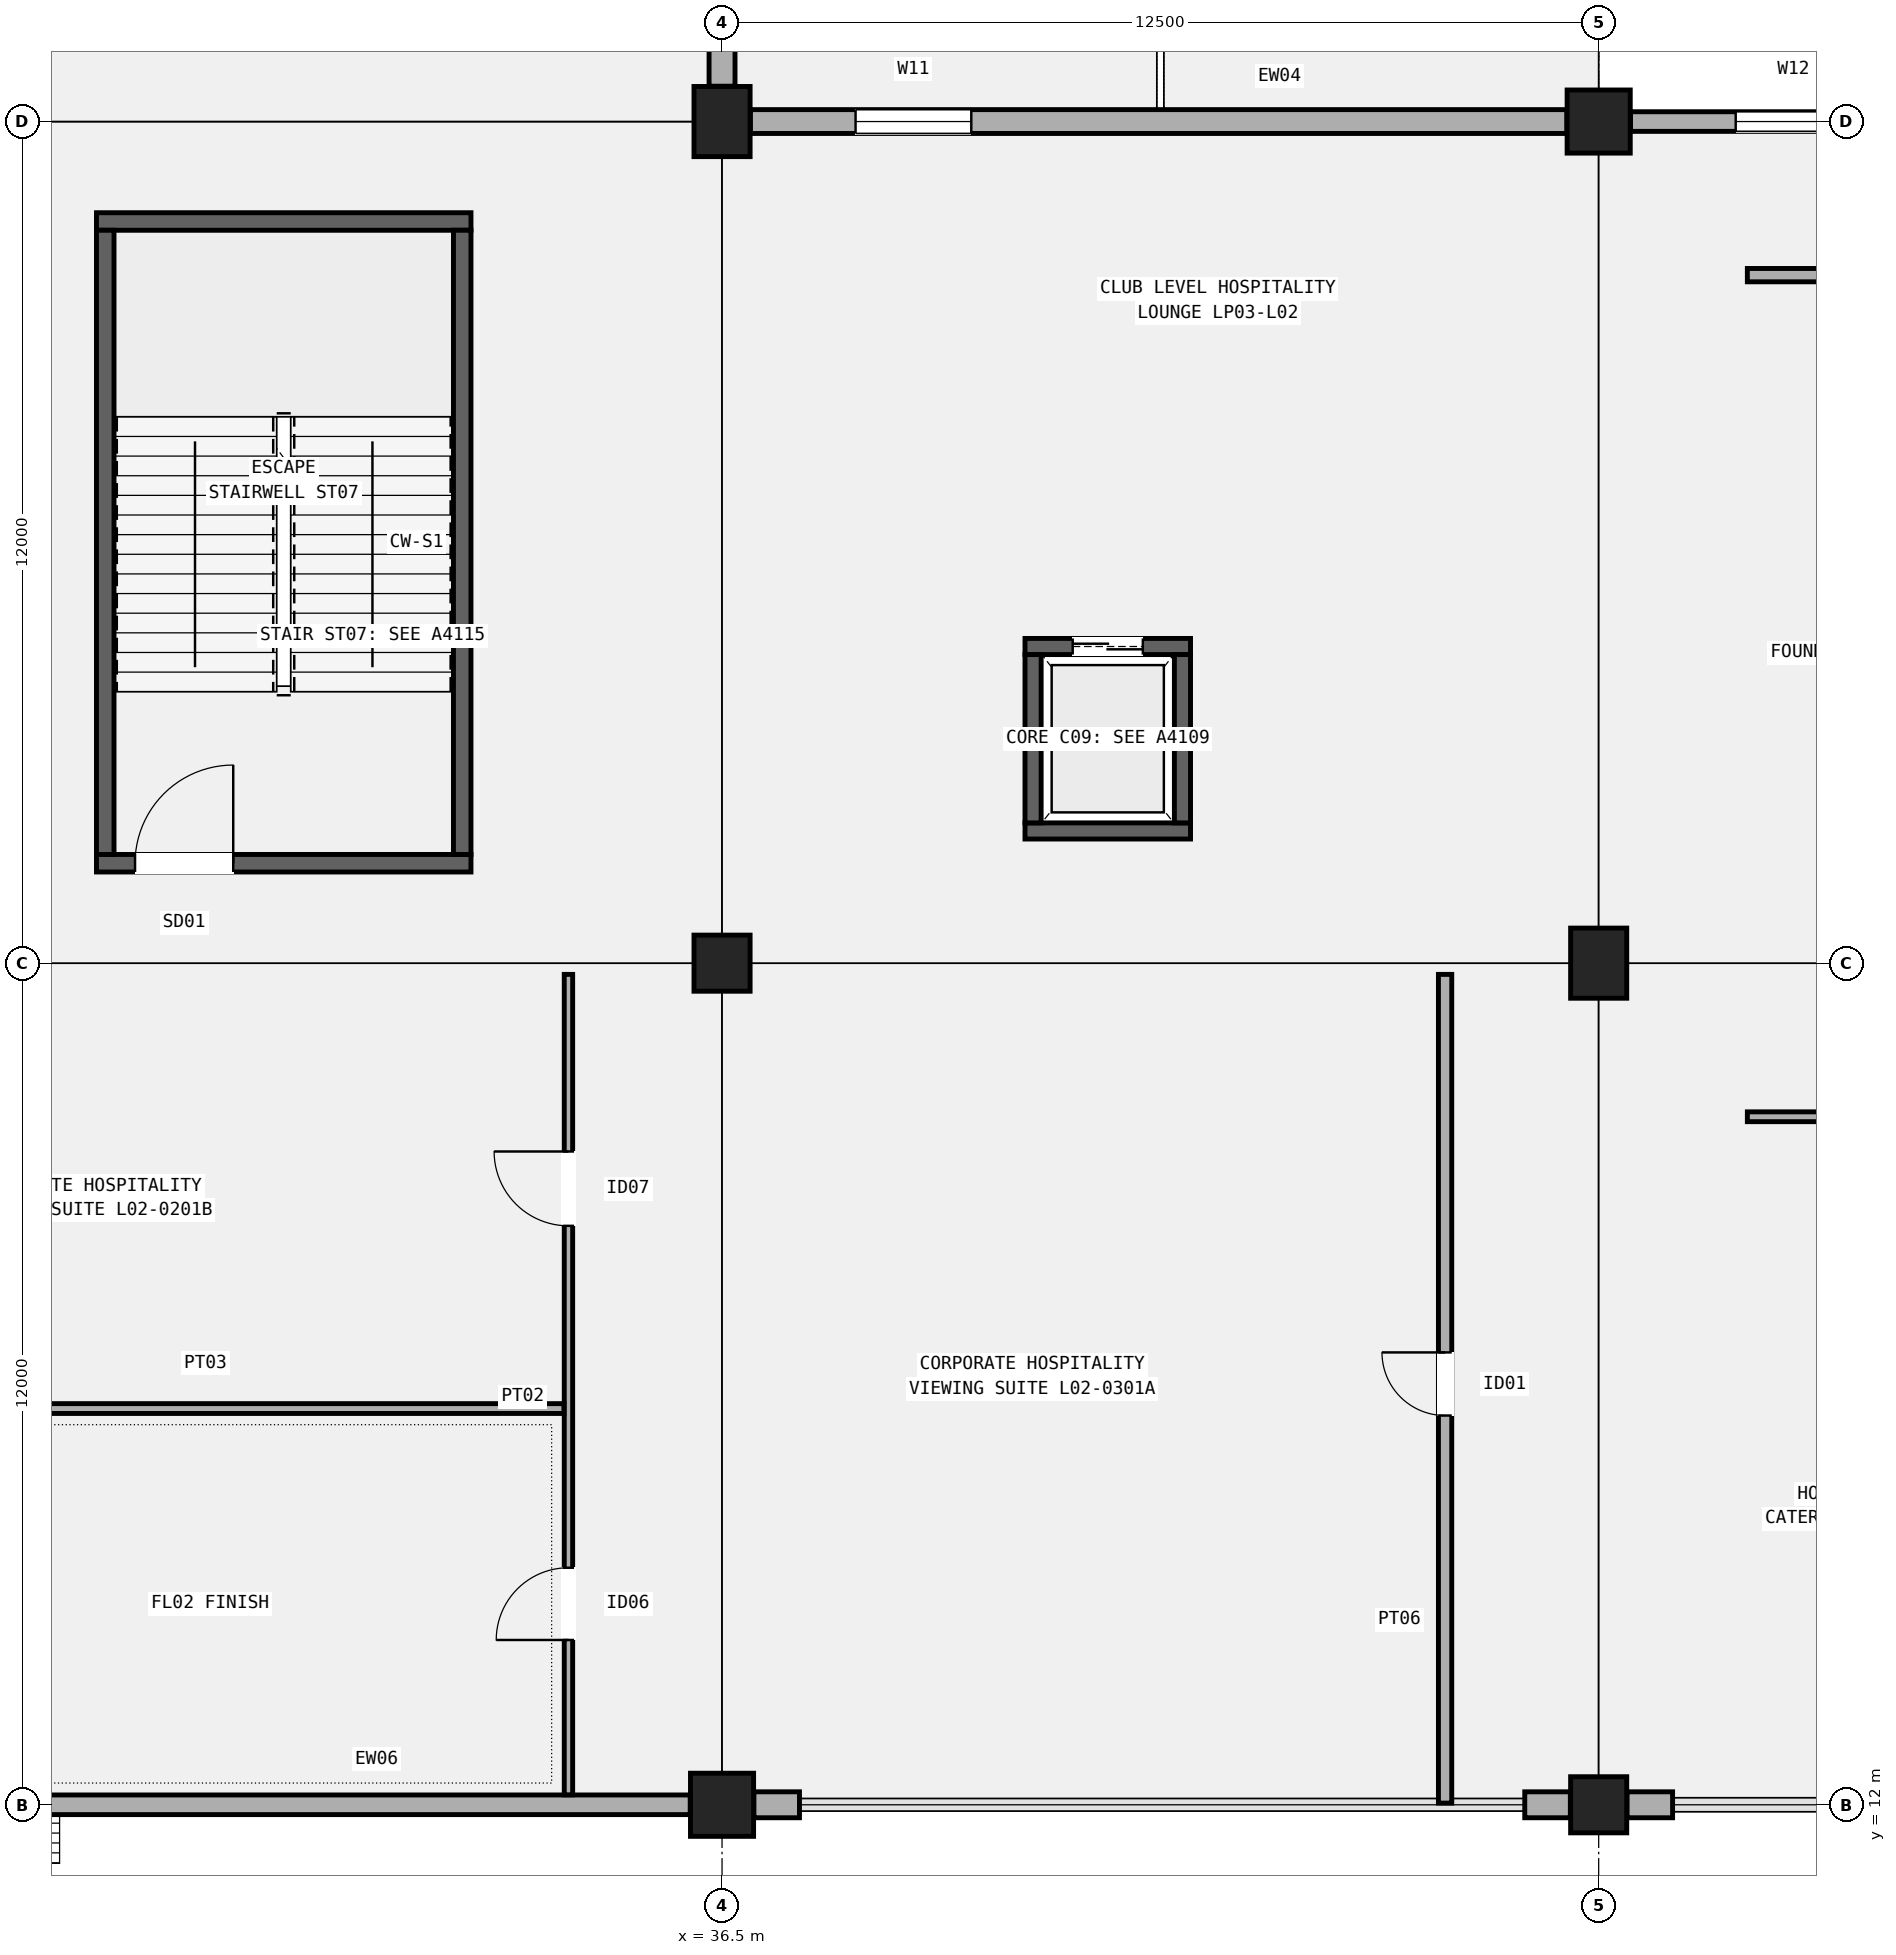
"""IFC4 building model, lengths in metres.
Left out: names, types, materials, properties, quantities, classifications, styles, units other than length and angle.
Written with IfcOpenShell. Run it as: python <this file> out.ifc"""

import sys

from ifc_helpers import new_model, si_unit, direction, frame, frame_2d, origin, origin_2d, place, context, subcontext, project, spatial, rectangle, extrude, element, fill, save


model = new_model("IFC4")
c1 = context("Model", 3, precision=1e-05, world=origin(), true_north=direction((0.0, 1.0)))
c2 = subcontext(c1, "Body", "Model", "MODEL_VIEW")
j1 = project(units=[si_unit("LENGTHUNIT", "METRE"), si_unit("PLANEANGLEUNIT", "RADIAN")], contexts=[c1])
p1 = place(None, origin())
s1 = spatial("IfcSite", under=j1, at=p1, CompositionType="ELEMENT")
p2 = place(p1, origin())
s2 = spatial("IfcBuilding", under=s1, at=p2, CompositionType="ELEMENT")
p3 = place(p2, frame((0.0, 0.0, 10.2)))
s3 = spatial("IfcBuildingStorey", under=s2, at=p3, CompositionType="ELEMENT", Elevation=10.2)
p4 = place(p3, frame((36.5, 12.0, 0.0), z_axis=(0.0, 0.0, 1.0), x_axis=(1.0, 0.0, 0.0)))
e1 = element("IfcColumn", 1, at=p4, inside=s3, PredefinedType="COLUMN", context=c2, shape_type="SweptSolid", body=[
    extrude(rectangle(XDim=0.9, YDim=0.9, at=origin_2d()), origin(), (0.0, 0.0, 1.0), 5.1),
])
p5 = place(p3, frame((36.5, 24.0, 0.0), z_axis=(0.0, 0.0, 1.0), x_axis=(1.0, 0.0, 0.0)))
e2 = element("IfcColumn", 2, at=p5, inside=s3, PredefinedType="COLUMN", context=c2, shape_type="SweptSolid", body=[
    extrude(rectangle(XDim=0.8, YDim=0.8, at=origin_2d()), origin(), (0.0, 0.0, 1.0), 5.1),
])
p6 = place(p3, frame((36.5, 36.0, 0.0), z_axis=(0.0, 0.0, 1.0), x_axis=(1.0, 0.0, 0.0)))
e3 = element("IfcColumn", 3, at=p6, inside=s3, PredefinedType="COLUMN", context=c2, shape_type="SweptSolid", body=[
    extrude(rectangle(XDim=0.8, YDim=1.0, at=origin_2d()), origin(), (0.0, 0.0, 1.0), 5.1),
])
p7 = place(p3, frame((49.0, 12.0, 0.0), z_axis=(0.0, 0.0, 1.0), x_axis=(1.0, 0.0, 0.0)))
e4 = element("IfcColumn", 4, at=p7, inside=s3, PredefinedType="COLUMN", context=c2, shape_type="SweptSolid", body=[
    extrude(rectangle(XDim=0.8, YDim=0.8, at=origin_2d()), origin(), (0.0, 0.0, 1.0), 5.1),
])
p8 = place(p3, frame((49.0, 24.0, 0.0), z_axis=(0.0, 0.0, 1.0), x_axis=(1.0, 0.0, 0.0)))
e5 = element("IfcColumn", 5, at=p8, inside=s3, PredefinedType="COLUMN", context=c2, shape_type="SweptSolid", body=[
    extrude(rectangle(XDim=0.8, YDim=1.0, at=origin_2d()), origin(), (0.0, 0.0, 1.0), 5.1),
])
p9 = place(p3, frame((49.0, 36.0, 0.0), z_axis=(0.0, 0.0, 1.0), x_axis=(1.0, 0.0, 0.0)))
e6 = element("IfcColumn", 6, at=p9, inside=s3, PredefinedType="COLUMN", context=c2, shape_type="SweptSolid", body=[
    extrude(rectangle(XDim=0.9, YDim=0.9, at=origin_2d()), origin(), (0.0, 0.0, 1.0), 5.1),
])
p10 = place(p3, frame((24.404, 12.0, 0.0), z_axis=(0.0, 0.0, 1.0), x_axis=(1.0, 0.0, 0.0)))
e7 = element("IfcWall", 7, at=p10, inside=s3, PredefinedType="SOLIDWALL", context=c2, shape_type="SweptSolid", body=[
    extrude(rectangle(XDim=11.642, YDim=0.28, at=frame_2d((5.821, 0.0))), origin(), (0.0, 0.0, 1.0), 4.02),
])
p11 = place(p10, frame((1.5, 0.0, 0.95)))
e8 = element("IfcOpeningElement", 8, at=p11, cuts=e7, PredefinedType="OPENING", context=c2, shape_type="SweptSolid", body=[
    extrude(rectangle(XDim=0.9, YDim=2.7, at=frame_2d((0.45, 1.35))), frame((0.0, 0.15, 0.0), z_axis=(0.0, -1.0, 0.0), x_axis=(1.0, 0.0, 0.0)), (0.0, 0.0, 1.0), 0.3),
])
p12 = place(p3, frame((36.5, 36.504, 0.0), z_axis=(0.0, 0.0, 1.0), x_axis=(0.0, 1.0, 0.0)))
e9 = element("IfcWall", 9, at=p12, inside=s3, PredefinedType="SOLIDWALL", context=c2, shape_type="SweptSolid", body=[
    extrude(rectangle(XDim=0.65, YDim=0.37, at=frame_2d((0.325, 0.0))), origin(), (0.0, 0.0, 1.0), 4.02),
])
for number, where, z_axis, x_axis in (
    (10, (36.954, 12.0, 0.0), (0.0, 0.0, 1.0), (1.0, 0.0, 0.0)),
    (11, (47.946, 12.0, 0.0), (0.0, 0.0, 1.0), (1.0, 0.0, 0.0)),
):
    element("IfcWall", number, at=place(p3, frame(where, z_axis=z_axis, x_axis=x_axis)), inside=s3, PredefinedType="SOLIDWALL", context=c2, shape_type="SweptSolid", body=[
        extrude(rectangle(XDim=0.65, YDim=0.37, at=frame_2d((0.325, 0.0))), origin(), (0.0, 0.0, 1.0), 4.12),
    ])
p13 = place(p3, frame((36.904, 36.0, 0.0), z_axis=(0.0, 0.0, 1.0), x_axis=(1.0, 0.0, 0.0)))
e12 = element("IfcWall", 12, at=p13, inside=s3, PredefinedType="SOLIDWALL", context=c2, shape_type="SweptSolid", body=[
    extrude(rectangle(XDim=11.642, YDim=0.34, at=frame_2d((5.821, 0.0))), origin(), (0.0, 0.0, 1.0), 4.02),
])
p14 = place(p13, frame((1.5, 0.0, 0.95)))
e13 = element("IfcOpeningElement", 13, at=p14, cuts=e12, PredefinedType="OPENING", context=c2, shape_type="SweptSolid", body=[
    extrude(rectangle(XDim=1.65, YDim=2.05, at=frame_2d((0.825, 1.025))), frame((0.0, 0.18, 0.0), z_axis=(0.0, -1.0, 0.0), x_axis=(1.0, 0.0, 0.0)), (0.0, 0.0, 1.0), 0.36),
])
p15 = place(p3, frame((49.404, 12.0, 0.0), z_axis=(0.0, 0.0, 1.0), x_axis=(1.0, 0.0, 0.0)))
e14 = element("IfcWall", 14, at=p15, inside=s3, PredefinedType="SOLIDWALL", context=c2, shape_type="SweptSolid", body=[
    extrude(rectangle(XDim=0.65, YDim=0.37, at=frame_2d((0.325, 0.0))), origin(), (0.0, 0.0, 1.0), 4.22),
])
p16 = place(p3, frame((49.454, 36.0, 0.0), z_axis=(0.0, 0.0, 1.0), x_axis=(1.0, 0.0, 0.0)))
e15 = element("IfcWall", 15, at=p16, inside=s3, PredefinedType="SOLIDWALL", context=c2, shape_type="SweptSolid", body=[
    extrude(rectangle(XDim=11.642, YDim=0.28, at=frame_2d((5.821, 0.0))), origin(), (0.0, 0.0, 1.0), 4.12),
])
p17 = place(p16, frame((1.5, 0.0, 0.95)))
e16 = element("IfcOpeningElement", 16, at=p17, cuts=e15, PredefinedType="OPENING", context=c2, shape_type="SweptSolid", body=[
    extrude(rectangle(XDim=1.65, YDim=2.45, at=frame_2d((0.825, 1.225))), frame((0.0, 0.15, 0.0), z_axis=(0.0, -1.0, 0.0), x_axis=(1.0, 0.0, 0.0)), (0.0, 0.0, 1.0), 0.3),
])
p18 = place(p3, frame((27.58, 25.425, 0.0), z_axis=(0.0, 0.0, 1.0), x_axis=(1.0, 0.0, 0.0)))
e17 = element("IfcWall", 17, at=p18, inside=s3, PredefinedType="SHEAR", context=c2, shape_type="SweptSolid", body=[
    extrude(rectangle(XDim=5.34, YDim=0.25, at=frame_2d((2.67, 0.0))), origin(), (0.0, 0.0, 1.0), 4.82),
])
p19 = place(p18, frame((0.55, 0.0, 0.0)))
e18 = element("IfcOpeningElement", 18, at=p19, cuts=e17, PredefinedType="OPENING", context=c2, shape_type="SweptSolid", body=[
    extrude(rectangle(XDim=1.4, YDim=2.15, at=frame_2d((0.7, 1.075))), frame((0.0, 0.135, 0.0), z_axis=(0.0, -1.0, 0.0), x_axis=(1.0, 0.0, 0.0)), (0.0, 0.0, 1.0), 0.27),
])
p20 = place(p3, frame((27.58, 34.575, 0.0), z_axis=(0.0, 0.0, 1.0), x_axis=(1.0, 0.0, 0.0)))
e19 = element("IfcWall", 19, at=p20, inside=s3, PredefinedType="SHEAR", context=c2, shape_type="SweptSolid", body=[
    extrude(rectangle(XDim=5.34, YDim=0.25, at=frame_2d((2.67, 0.0))), origin(), (0.0, 0.0, 1.0), 4.82),
])
for number, where, z_axis, x_axis in (
    (20, (27.705, 25.55, 0.0), (0.0, 0.0, 1.0), (0.0, 1.0, 0.0)),
    (21, (32.795, 25.55, 0.0), (0.0, 0.0, 1.0), (0.0, 1.0, 0.0)),
):
    element("IfcWall", number, at=place(p3, frame(where, z_axis=z_axis, x_axis=x_axis)), inside=s3, PredefinedType="SHEAR", context=c2, shape_type="SweptSolid", body=[
        extrude(rectangle(XDim=8.9, YDim=0.25, at=frame_2d((4.45, 0.0))), origin(), (0.0, 0.0, 1.0), 4.82),
    ])
p21 = place(p3, frame((40.82, 25.885, 0.0), z_axis=(0.0, 0.0, 1.0), x_axis=(1.0, 0.0, 0.0)))
e22 = element("IfcWall", 22, at=p21, inside=s3, PredefinedType="SHEAR", context=c2, shape_type="SweptSolid", body=[
    extrude(rectangle(XDim=2.36, YDim=0.23, at=frame_2d((1.18, 0.0))), origin(), (0.0, 0.0, 1.0), 4.82),
])
p22 = place(p3, frame((40.82, 28.515, 0.0), z_axis=(0.0, 0.0, 1.0), x_axis=(1.0, 0.0, 0.0)))
e23 = element("IfcWall", 23, at=p22, inside=s3, PredefinedType="SHEAR", context=c2, shape_type="SweptSolid", body=[
    extrude(rectangle(XDim=2.36, YDim=0.23, at=frame_2d((1.18, 0.0))), origin(), (0.0, 0.0, 1.0), 4.82),
])
p23 = place(p22, frame((0.68, 0.0, 0.0)))
e24 = element("IfcOpeningElement", 24, at=p23, cuts=e23, PredefinedType="OPENING", context=c2, shape_type="SweptSolid", body=[
    extrude(rectangle(XDim=1.0, YDim=2.15, at=frame_2d((0.5, 1.075))), frame((0.0, 0.125, 0.0), z_axis=(0.0, -1.0, 0.0), x_axis=(1.0, 0.0, 0.0)), (0.0, 0.0, 1.0), 0.25),
])
for number, where, z_axis, x_axis in (
    (25, (40.935, 26.0, 0.0), (0.0, 0.0, 1.0), (0.0, 1.0, 0.0)),
    (26, (43.065, 26.0, 0.0), (0.0, 0.0, 1.0), (0.0, 1.0, 0.0)),
):
    element("IfcWall", number, at=place(p3, frame(where, z_axis=z_axis, x_axis=x_axis)), inside=s3, PredefinedType="SHEAR", context=c2, shape_type="SweptSolid", body=[
        extrude(rectangle(XDim=2.4, YDim=0.23, at=frame_2d((1.2, 0.0))), origin(), (0.0, 0.0, 1.0), 4.82),
    ])
p24 = place(p3, frame((34.31, 12.142, 0.0), z_axis=(0.0, 0.0, 1.0), x_axis=(0.0, 1.0, 0.0)))
e27 = element("IfcWall", 27, at=p24, inside=s3, PredefinedType="PARTITIONING", context=c2, shape_type="SweptSolid", body=[
    extrude(rectangle(XDim=11.698, YDim=0.12, at=frame_2d((5.849, 0.0))), origin(), (0.0, 0.0, 1.0), 4.22),
])
p25 = place(p24, frame((2.208, 0.0, 0.0)))
e28 = element("IfcOpeningElement", 28, at=p25, cuts=e27, PredefinedType="OPENING", context=c2, shape_type="SweptSolid", body=[
    extrude(rectangle(XDim=1.03, YDim=2.12, at=frame_2d((0.515, 1.06))), frame((0.0, 0.07, 0.0), z_axis=(0.0, -1.0, 0.0), x_axis=(1.0, 0.0, 0.0)), (0.0, 0.0, 1.0), 0.14),
])
p26 = place(p24, frame((8.113, 0.0, 0.0)))
e29 = element("IfcOpeningElement", 29, at=p26, cuts=e27, PredefinedType="OPENING", context=c2, shape_type="SweptSolid", body=[
    extrude(rectangle(XDim=1.06, YDim=2.15, at=frame_2d((0.53, 1.075))), frame((0.0, 0.07, 0.0), z_axis=(0.0, -1.0, 0.0), x_axis=(1.0, 0.0, 0.0)), (0.0, 0.0, 1.0), 0.14),
])
p27 = place(p3, frame((24.024, 17.65, 0.0), z_axis=(0.0, 0.0, 1.0), x_axis=(1.0, 0.0, 0.0)))
e30 = element("IfcWall", 30, at=p27, inside=s3, PredefinedType="PARTITIONING", context=c2, shape_type="SweptSolid", body=[
    extrude(rectangle(XDim=10.221, YDim=0.14, at=frame_2d((5.111, 0.0))), origin(), (0.0, 0.0, 1.0), 4.22),
])
p28 = place(p3, frame((46.81, 12.024, 0.0), z_axis=(0.0, 0.0, 1.0), x_axis=(0.0, 1.0, 0.0)))
e31 = element("IfcWall", 31, at=p28, inside=s3, PredefinedType="PARTITIONING", context=c2, shape_type="SweptSolid", body=[
    extrude(rectangle(XDim=11.816, YDim=0.19, at=frame_2d((5.908, 0.0))), origin(), (0.0, 0.0, 1.0), 4.22),
])
p29 = place(p28, frame((5.526, 0.0, 0.0)))
e32 = element("IfcOpeningElement", 32, at=p29, cuts=e31, PredefinedType="OPENING", context=c2, shape_type="SweptSolid", body=[
    extrude(rectangle(XDim=0.9, YDim=2.06, at=frame_2d((0.45, 1.03))), frame((0.0, 0.105, 0.0), z_axis=(0.0, -1.0, 0.0), x_axis=(1.0, 0.0, 0.0)), (0.0, 0.0, 1.0), 0.21),
])
p30 = place(p3, frame((51.12, 21.81, 0.0), z_axis=(0.0, 0.0, 1.0), x_axis=(1.0, 0.0, 0.0)))
e33 = element("IfcWall", 33, at=p30, inside=s3, PredefinedType="PARTITIONING", context=c2, shape_type="SweptSolid", body=[
    extrude(rectangle(XDim=10.22, YDim=0.14, at=frame_2d((5.11, 0.0))), origin(), (0.0, 0.0, 1.0), 4.22),
])
p31 = place(p30, frame((5.57, 0.0, 0.0), z_axis=(0.0, 0.0, 1.0), x_axis=(-1.0, 0.0, 0.0)))
e34 = element("IfcOpeningElement", 34, at=p31, cuts=e33, PredefinedType="OPENING", context=c2, shape_type="SweptSolid", body=[
    extrude(rectangle(XDim=0.92, YDim=2.1, at=frame_2d((0.46, 1.05))), frame((0.0, 0.08, 0.0), z_axis=(0.0, -1.0, 0.0), x_axis=(1.0, 0.0, 0.0)), (0.0, 0.0, 1.0), 0.16),
])
p32 = place(p3, frame((51.12, 33.81, 0.0), z_axis=(0.0, 0.0, 1.0), x_axis=(1.0, 0.0, 0.0)))
e35 = element("IfcWall", 35, at=p32, inside=s3, PredefinedType="PARTITIONING", context=c2, shape_type="SweptSolid", body=[
    extrude(rectangle(XDim=10.22, YDim=0.19, at=frame_2d((5.11, 0.0))), origin(), (0.0, 0.0, 1.0), 4.22),
])
p33 = place(p32, frame((5.585, 0.0, 0.0), z_axis=(0.0, 0.0, 1.0), x_axis=(-1.0, 0.0, 0.0)))
e36 = element("IfcOpeningElement", 36, at=p33, cuts=e35, PredefinedType="OPENING", context=c2, shape_type="SweptSolid", body=[
    extrude(rectangle(XDim=0.95, YDim=2.12, at=frame_2d((0.475, 1.06))), frame((0.0, 0.105, 0.0), z_axis=(0.0, -1.0, 0.0), x_axis=(1.0, 0.0, 0.0)), (0.0, 0.0, 1.0), 0.21),
])
p34 = place(p14, origin())
e37 = element("IfcWindow", 37, at=p34, inside=s3, PartitioningType="SINGLE_PANEL", PredefinedType="WINDOW", context=c2, shape_type="SweptSolid", body=[
    extrude(rectangle(XDim=1.65, YDim=2.05, at=frame_2d((0.825, 1.025))), frame((0.0, 0.03, 0.0), z_axis=(0.0, -1.0, 0.0), x_axis=(1.0, 0.0, 0.0)), (0.0, 0.0, 1.0), 0.06),
])
fill(e13, e37)
p35 = place(p17, origin())
e38 = element("IfcWindow", 38, at=p35, inside=s3, PartitioningType="SINGLE_PANEL", PredefinedType="WINDOW", context=c2, shape_type="SweptSolid", body=[
    extrude(rectangle(XDim=1.65, YDim=2.45, at=frame_2d((0.825, 1.225))), frame((0.0, 0.03, 0.0), z_axis=(0.0, -1.0, 0.0), x_axis=(1.0, 0.0, 0.0)), (0.0, 0.0, 1.0), 0.06),
])
fill(e16, e38)
p36 = place(p19, origin())
e39 = element("IfcDoor", 39, at=p36, inside=s3, OperationType="SINGLE_SWING_RIGHT", PredefinedType="DOOR", context=c2, shape_type="SweptSolid", body=[
    extrude(rectangle(XDim=1.4, YDim=2.15, at=frame_2d((0.7, 1.075))), frame((0.0, 0.025, 0.0), z_axis=(0.0, -1.0, 0.0), x_axis=(1.0, 0.0, 0.0)), (0.0, 0.0, 1.0), 0.05),
])
fill(e18, e39)
p37 = place(p23, origin())
e40 = element("IfcDoor", 40, at=p37, inside=s3, OperationType="DOUBLE_DOOR_SLIDING", PredefinedType="DOOR", context=c2, shape_type="SweptSolid", body=[
    extrude(rectangle(XDim=1.0, YDim=2.15, at=frame_2d((0.5, 1.075))), frame((0.0, 0.025, 0.0), z_axis=(0.0, -1.0, 0.0), x_axis=(1.0, 0.0, 0.0)), (0.0, 0.0, 1.0), 0.05),
])
fill(e24, e40)
p38 = place(p25, origin())
e41 = element("IfcDoor", 41, at=p38, inside=s3, OperationType="SINGLE_SWING_LEFT", PredefinedType="DOOR", context=c2, shape_type="SweptSolid", body=[
    extrude(rectangle(XDim=1.03, YDim=2.12, at=frame_2d((0.515, 1.06))), frame((0.0, 0.025, 0.0), z_axis=(0.0, -1.0, 0.0), x_axis=(1.0, 0.0, 0.0)), (0.0, 0.0, 1.0), 0.05),
])
fill(e28, e41)
p39 = place(p26, origin())
e42 = element("IfcDoor", 42, at=p39, inside=s3, OperationType="SINGLE_SWING_RIGHT", PredefinedType="DOOR", context=c2, shape_type="SweptSolid", body=[
    extrude(rectangle(XDim=1.06, YDim=2.15, at=frame_2d((0.53, 1.075))), frame((0.0, 0.025, 0.0), z_axis=(0.0, -1.0, 0.0), x_axis=(1.0, 0.0, 0.0)), (0.0, 0.0, 1.0), 0.05),
])
fill(e29, e42)
p40 = place(p29, origin())
e43 = element("IfcDoor", 43, at=p40, inside=s3, OperationType="SINGLE_SWING_RIGHT", PredefinedType="DOOR", context=c2, shape_type="SweptSolid", body=[
    extrude(rectangle(XDim=0.9, YDim=2.06, at=frame_2d((0.45, 1.03))), frame((0.0, 0.025, 0.0), z_axis=(0.0, -1.0, 0.0), x_axis=(1.0, 0.0, 0.0)), (0.0, 0.0, 1.0), 0.05),
])
fill(e32, e43)
save(model, sys.argv[1])
